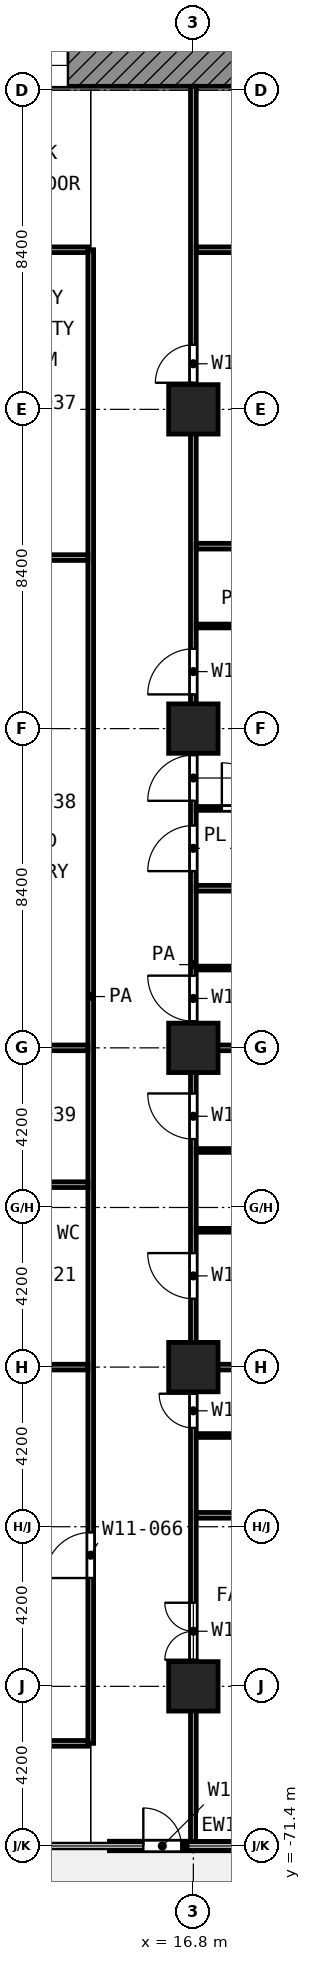
"""IFC4 building model, lengths in metres.
Left out: names, types, materials, properties, quantities, classifications, styles, units other than length and angle.
Written with IfcOpenShell. Run it as: python <this file> out.ifc"""

import sys

from ifc_helpers import new_model, si_unit, direction, frame, frame_2d, origin, origin_2d, place, context, subcontext, project, spatial, rectangle, extrude, element, fill, save


model = new_model("IFC4")
c1 = context("Model", 3, precision=1e-05, world=origin(), true_north=direction((0.0, 1.0)))
c2 = subcontext(c1, "Body", "Model", "MODEL_VIEW")
j1 = project(units=[si_unit("LENGTHUNIT", "METRE"), si_unit("PLANEANGLEUNIT", "RADIAN")], contexts=[c1])
p1 = place(None, origin())
s1 = spatial("IfcSite", under=j1, at=p1, CompositionType="ELEMENT")
p2 = place(p1, origin())
s2 = spatial("IfcBuilding", under=s1, at=p2, CompositionType="ELEMENT")
p3 = place(p2, frame((0.0, 0.0, 72.8)))
s3 = spatial("IfcBuildingStorey", under=s2, at=p3, CompositionType="ELEMENT", Elevation=72.8)
for number, where, z_axis, x_axis in (
    (1, (16.8, -33.6, 0.0), (0.0, 0.0, 1.0), (1.0, 0.0, 0.0)),
    (2, (16.8, -42.0, 0.0), (0.0, 0.0, 1.0), (1.0, 0.0, 0.0)),
    (3, (16.8, -50.4, 0.0), (0.0, 0.0, 1.0), (1.0, 0.0, 0.0)),
    (4, (16.8, -58.8, 0.0), (0.0, 0.0, 1.0), (1.0, 0.0, 0.0)),
    (5, (16.8, -67.2, 0.0), (0.0, 0.0, 1.0), (1.0, 0.0, 0.0)),
):
    element("IfcColumn", number, at=place(p3, frame(where, z_axis=z_axis, x_axis=x_axis)), inside=s3, PredefinedType="COLUMN", context=c2, shape_type="SweptSolid", body=[
        extrude(rectangle(XDim=1.3, YDim=1.3, at=origin_2d()), origin(), (0.0, 0.0, 1.0), 4.2),
    ])
p4 = place(p3, frame((14.592, -71.4, 0.0), z_axis=(0.0, 0.0, 1.0), x_axis=(1.0, 0.0, 0.0)))
e6 = element("IfcWall", 6, at=p4, inside=s3, PredefinedType="SOLIDWALL", context=c2, shape_type="SweptSolid", body=[
    extrude(rectangle(XDim=3.983, YDim=0.25, at=frame_2d((1.992, 0.0))), origin(), (0.0, 0.0, 1.0), 3.78),
])
p5 = place(p4, frame((0.892, 0.0, 0.0)))
e7 = element("IfcOpeningElement", 7, at=p5, cuts=e6, PredefinedType="OPENING", context=c2, shape_type="SweptSolid", body=[
    extrude(rectangle(XDim=1.0, YDim=2.1, at=frame_2d((0.5, 1.05))), frame((0.0, 0.135, 0.0), z_axis=(0.0, -1.0, 0.0), x_axis=(1.0, 0.0, 0.0)), (0.0, 0.0, 1.0), 0.27),
])
p6 = place(p3, frame((5.4, -24.55, 0.0), z_axis=(0.0, 0.0, 1.0), x_axis=(1.0, 0.0, 0.0)))
e8 = element("IfcWall", 8, at=p6, inside=s3, PredefinedType="SHEAR", context=c2, shape_type="SweptSolid", body=[
    extrude(rectangle(XDim=18.6, YDim=1.1, at=frame_2d((9.3, 0.0))), origin(), (0.0, 0.0, 1.0), 3.9),
])
p7 = place(p6, frame((6.3, 0.0, 0.0)))
e9 = element("IfcOpeningElement", 9, at=p7, cuts=e8, PredefinedType="OPENING", context=c2, shape_type="SweptSolid", body=[
    extrude(rectangle(XDim=1.8, YDim=2.1, at=frame_2d((0.9, 1.05))), frame((0.0, 0.56, 0.0), z_axis=(0.0, -1.0, 0.0), x_axis=(1.0, 0.0, 0.0)), (0.0, 0.0, 1.0), 1.12),
])
p8 = place(p3, frame((16.875, -60.6, 0.0), z_axis=(0.0, 0.0, 1.0), x_axis=(1.0, 0.0, 0.0)))
e10 = element("IfcWall", 10, at=p8, inside=s3, PredefinedType="PARTITIONING", context=c2, shape_type="SweptSolid", body=[
    extrude(rectangle(XDim=3.175, YDim=0.1, at=frame_2d((1.587, 0.0))), origin(), (0.0, 0.0, 1.0), 3.9),
])
p9 = place(p3, frame((16.875, -55.2, 0.0), z_axis=(0.0, 0.0, 1.0), x_axis=(1.0, 0.0, 0.0)))
e11 = element("IfcWall", 11, at=p9, inside=s3, PredefinedType="PARTITIONING", context=c2, shape_type="SweptSolid", body=[
    extrude(rectangle(XDim=2.573, YDim=0.1, at=frame_2d((1.287, 0.0))), origin(), (0.0, 0.0, 1.0), 3.9),
])
p10 = place(p3, frame((16.875, -53.1, 0.0), z_axis=(0.0, 0.0, 1.0), x_axis=(1.0, 0.0, 0.0)))
e12 = element("IfcWall", 12, at=p10, inside=s3, PredefinedType="PARTITIONING", context=c2, shape_type="SweptSolid", body=[
    extrude(rectangle(XDim=2.574, YDim=0.1, at=frame_2d((1.287, 0.0))), origin(), (0.0, 0.0, 1.0), 3.9),
])
p11 = place(p3, frame((16.875, -48.3, 0.0), z_axis=(0.0, 0.0, 1.0), x_axis=(1.0, 0.0, 0.0)))
e13 = element("IfcWall", 13, at=p11, inside=s3, PredefinedType="PARTITIONING", context=c2, shape_type="SweptSolid", body=[
    extrude(rectangle(XDim=2.575, YDim=0.1, at=frame_2d((1.288, 0.0))), origin(), (0.0, 0.0, 1.0), 3.9),
])
p12 = place(p3, frame((16.875, -44.1, 0.0), z_axis=(0.0, 0.0, 1.0), x_axis=(1.0, 0.0, 0.0)))
e14 = element("IfcWall", 14, at=p12, inside=s3, PredefinedType="PARTITIONING", context=c2, shape_type="SweptSolid", body=[
    extrude(rectangle(XDim=2.575, YDim=0.1, at=frame_2d((1.288, 0.0))), origin(), (0.0, 0.0, 1.0), 3.9),
])
p13 = place(p12, frame((0.675, 0.0, 0.0)))
e15 = element("IfcOpeningElement", 15, at=p13, cuts=e14, PredefinedType="OPENING", context=c2, shape_type="SweptSolid", body=[
    extrude(rectangle(XDim=1.2, YDim=2.1, at=frame_2d((0.6, 1.05))), frame((0.0, 0.06, 0.0), z_axis=(0.0, -1.0, 0.0), x_axis=(1.0, 0.0, 0.0)), (0.0, 0.0, 1.0), 0.12),
])
p14 = place(p3, frame((16.875, -39.3, 0.0), z_axis=(0.0, 0.0, 1.0), x_axis=(1.0, 0.0, 0.0)))
e16 = element("IfcWall", 16, at=p14, inside=s3, PredefinedType="PARTITIONING", context=c2, shape_type="SweptSolid", body=[
    extrude(rectangle(XDim=2.575, YDim=0.1, at=frame_2d((1.288, 0.0))), origin(), (0.0, 0.0, 1.0), 3.9),
])
p15 = place(p3, frame((11.175, -68.7, 0.0), z_axis=(0.0, 0.0, 1.0), x_axis=(1.0, 0.0, 0.0)))
e17 = element("IfcWall", 17, at=p15, inside=s3, PredefinedType="PARTITIONING", context=c2, shape_type="SweptSolid", body=[
    extrude(rectangle(XDim=2.85, YDim=0.15, at=frame_2d((1.425, 0.0))), origin(), (0.0, 0.0, 1.0), 3.9),
])
p16 = place(p3, frame((16.875, -62.7, 0.0), z_axis=(0.0, 0.0, 1.0), x_axis=(1.0, 0.0, 0.0)))
e18 = element("IfcWall", 18, at=p16, inside=s3, PredefinedType="PARTITIONING", context=c2, shape_type="SweptSolid", body=[
    extrude(rectangle(XDim=8.245, YDim=0.15, at=frame_2d((4.123, 0.0))), origin(), (0.0, 0.0, 1.0), 3.9),
])
p17 = place(p3, frame((11.175, -58.8, 0.0), z_axis=(0.0, 0.0, 1.0), x_axis=(1.0, 0.0, 0.0)))
e19 = element("IfcWall", 19, at=p17, inside=s3, PredefinedType="PARTITIONING", context=c2, shape_type="SweptSolid", body=[
    extrude(rectangle(XDim=2.85, YDim=0.15, at=frame_2d((1.425, 0.0))), origin(), (0.0, 0.0, 1.0), 3.9),
])
p18 = place(p3, frame((16.875, -58.8, 0.0), z_axis=(0.0, 0.0, 1.0), x_axis=(1.0, 0.0, 0.0)))
e20 = element("IfcWall", 20, at=p18, inside=s3, PredefinedType="PARTITIONING", context=c2, shape_type="SweptSolid", body=[
    extrude(rectangle(XDim=8.245, YDim=0.15, at=frame_2d((4.123, 0.0))), origin(), (0.0, 0.0, 1.0), 3.9),
])
for number, where, z_axis, x_axis in (
    (21, (11.175, -54.0, 0.0), (0.0, 0.0, 1.0), (1.0, 0.0, 0.0)),
    (22, (11.175, -50.4, 0.0), (0.0, 0.0, 1.0), (1.0, 0.0, 0.0)),
):
    element("IfcWall", number, at=place(p3, frame(where, z_axis=z_axis, x_axis=x_axis)), inside=s3, PredefinedType="PARTITIONING", context=c2, shape_type="SweptSolid", body=[
        extrude(rectangle(XDim=2.85, YDim=0.15, at=frame_2d((1.425, 0.0))), origin(), (0.0, 0.0, 1.0), 3.9),
    ])
for number, where, z_axis, x_axis in (
    (23, (16.875, -50.4, 0.0), (0.0, 0.0, 1.0), (1.0, 0.0, 0.0)),
    (24, (16.875, -46.2, 0.0), (0.0, 0.0, 1.0), (1.0, 0.0, 0.0)),
):
    element("IfcWall", number, at=place(p3, frame(where, z_axis=z_axis, x_axis=x_axis)), inside=s3, PredefinedType="PARTITIONING", context=c2, shape_type="SweptSolid", body=[
        extrude(rectangle(XDim=8.245, YDim=0.15, at=frame_2d((4.123, 0.0))), origin(), (0.0, 0.0, 1.0), 3.9),
    ])
p19 = place(p3, frame((11.175, -37.5, 0.0), z_axis=(0.0, 0.0, 1.0), x_axis=(1.0, 0.0, 0.0)))
e25 = element("IfcWall", 25, at=p19, inside=s3, PredefinedType="PARTITIONING", context=c2, shape_type="SweptSolid", body=[
    extrude(rectangle(XDim=2.85, YDim=0.15, at=frame_2d((1.425, 0.0))), origin(), (0.0, 0.0, 1.0), 3.9),
])
p20 = place(p3, frame((16.875, -37.2, 0.0), z_axis=(0.0, 0.0, 1.0), x_axis=(1.0, 0.0, 0.0)))
e26 = element("IfcWall", 26, at=p20, inside=s3, PredefinedType="PARTITIONING", context=c2, shape_type="SweptSolid", body=[
    extrude(rectangle(XDim=8.245, YDim=0.15, at=frame_2d((4.123, 0.0))), origin(), (0.0, 0.0, 1.0), 3.9),
])
p21 = place(p3, frame((11.175, -29.4, 0.0), z_axis=(0.0, 0.0, 1.0), x_axis=(1.0, 0.0, 0.0)))
e27 = element("IfcWall", 27, at=p21, inside=s3, PredefinedType="PARTITIONING", context=c2, shape_type="SweptSolid", body=[
    extrude(rectangle(XDim=2.85, YDim=0.15, at=frame_2d((1.425, 0.0))), origin(), (0.0, 0.0, 1.0), 3.9),
])
p22 = place(p3, frame((16.875, -29.4, 0.0), z_axis=(0.0, 0.0, 1.0), x_axis=(1.0, 0.0, 0.0)))
e28 = element("IfcWall", 28, at=p22, inside=s3, PredefinedType="PARTITIONING", context=c2, shape_type="SweptSolid", body=[
    extrude(rectangle(XDim=8.25, YDim=0.15, at=frame_2d((4.125, 0.0))), origin(), (0.0, 0.0, 1.0), 3.9),
])
p23 = place(p3, frame((14.1, -68.7, 0.0), z_axis=(0.0, 0.0, 1.0), x_axis=(0.0, 1.0, 0.0)))
e29 = element("IfcWall", 29, at=p23, inside=s3, PredefinedType="PARTITIONING", context=c2, shape_type="SweptSolid", body=[
    extrude(rectangle(XDim=39.3, YDim=0.15, at=frame_2d((19.65, 0.0))), origin(), (0.0, 0.0, 1.0), 3.9),
])
p24 = place(p23, frame((4.35, 0.0, 0.0)))
e30 = element("IfcOpeningElement", 30, at=p24, cuts=e29, PredefinedType="OPENING", context=c2, shape_type="SweptSolid", body=[
    extrude(rectangle(XDim=1.2, YDim=2.1, at=frame_2d((0.6, 1.05))), frame((0.0, 0.085, 0.0), z_axis=(0.0, -1.0, 0.0), x_axis=(1.0, 0.0, 0.0)), (0.0, 0.0, 1.0), 0.17),
])
p25 = place(p3, frame((16.8, -71.32, 0.0), z_axis=(0.0, 0.0, 1.0), x_axis=(0.0, 1.0, 0.0)))
e31 = element("IfcWall", 31, at=p25, inside=s3, PredefinedType="PARTITIONING", context=c2, shape_type="SweptSolid", body=[
    extrude(rectangle(XDim=46.22, YDim=0.15, at=frame_2d((23.11, 0.0))), origin(), (0.0, 0.0, 1.0), 3.9),
])
p26 = place(p25, frame((38.42, 0.0, 0.0)))
e32 = element("IfcOpeningElement", 32, at=p26, cuts=e31, PredefinedType="OPENING", context=c2, shape_type="SweptSolid", body=[
    extrude(rectangle(XDim=1.0, YDim=2.1, at=frame_2d((0.5, 1.05))), frame((0.0, 0.085, 0.0), z_axis=(0.0, -1.0, 0.0), x_axis=(1.0, 0.0, 0.0)), (0.0, 0.0, 1.0), 0.17),
])
p27 = place(p25, frame((30.22, 0.0, 0.0)))
e33 = element("IfcOpeningElement", 33, at=p27, cuts=e31, PredefinedType="OPENING", context=c2, shape_type="SweptSolid", body=[
    extrude(rectangle(XDim=1.2, YDim=2.1, at=frame_2d((0.6, 1.05))), frame((0.0, 0.085, 0.0), z_axis=(0.0, -1.0, 0.0), x_axis=(1.0, 0.0, 0.0)), (0.0, 0.0, 1.0), 0.17),
])
p28 = place(p25, frame((27.42, 0.0, 0.0)))
e34 = element("IfcOpeningElement", 34, at=p28, cuts=e31, PredefinedType="OPENING", context=c2, shape_type="SweptSolid", body=[
    extrude(rectangle(XDim=1.2, YDim=2.1, at=frame_2d((0.6, 1.05))), frame((0.0, 0.085, 0.0), z_axis=(0.0, -1.0, 0.0), x_axis=(1.0, 0.0, 0.0)), (0.0, 0.0, 1.0), 0.17),
])
p29 = place(p25, frame((25.57, 0.0, 0.0)))
e35 = element("IfcOpeningElement", 35, at=p29, cuts=e31, PredefinedType="OPENING", context=c2, shape_type="SweptSolid", body=[
    extrude(rectangle(XDim=1.2, YDim=2.1, at=frame_2d((0.6, 1.05))), frame((0.0, 0.085, 0.0), z_axis=(0.0, -1.0, 0.0), x_axis=(1.0, 0.0, 0.0)), (0.0, 0.0, 1.0), 0.17),
])
p30 = place(p25, frame((21.62, 0.0, 0.0)))
e36 = element("IfcOpeningElement", 36, at=p30, cuts=e31, PredefinedType="OPENING", context=c2, shape_type="SweptSolid", body=[
    extrude(rectangle(XDim=1.2, YDim=2.1, at=frame_2d((0.6, 1.05))), frame((0.0, 0.085, 0.0), z_axis=(0.0, -1.0, 0.0), x_axis=(1.0, 0.0, 0.0)), (0.0, 0.0, 1.0), 0.17),
])
p31 = place(p25, frame((14.32, 0.0, 0.0)))
e37 = element("IfcOpeningElement", 37, at=p31, cuts=e31, PredefinedType="OPENING", context=c2, shape_type="SweptSolid", body=[
    extrude(rectangle(XDim=1.2, YDim=2.1, at=frame_2d((0.6, 1.05))), frame((0.0, 0.085, 0.0), z_axis=(0.0, -1.0, 0.0), x_axis=(1.0, 0.0, 0.0)), (0.0, 0.0, 1.0), 0.17),
])
p32 = place(p25, frame((18.52, 0.0, 0.0)))
e38 = element("IfcOpeningElement", 38, at=p32, cuts=e31, PredefinedType="OPENING", context=c2, shape_type="SweptSolid", body=[
    extrude(rectangle(XDim=1.2, YDim=2.1, at=frame_2d((0.6, 1.05))), frame((0.0, 0.085, 0.0), z_axis=(0.0, -1.0, 0.0), x_axis=(1.0, 0.0, 0.0)), (0.0, 0.0, 1.0), 0.17),
])
p33 = place(p25, frame((10.92, 0.0, 0.0)))
e39 = element("IfcOpeningElement", 39, at=p33, cuts=e31, PredefinedType="OPENING", context=c2, shape_type="SweptSolid", body=[
    extrude(rectangle(XDim=0.9, YDim=2.1, at=frame_2d((0.45, 1.05))), frame((0.0, 0.085, 0.0), z_axis=(0.0, -1.0, 0.0), x_axis=(1.0, 0.0, 0.0)), (0.0, 0.0, 1.0), 0.17),
])
p34 = place(p25, frame((4.82, 0.0, 0.0)))
e40 = element("IfcOpeningElement", 40, at=p34, cuts=e31, PredefinedType="OPENING", context=c2, shape_type="SweptSolid", body=[
    extrude(rectangle(XDim=1.5, YDim=2.1, at=frame_2d((0.75, 1.05))), frame((0.0, 0.085, 0.0), z_axis=(0.0, -1.0, 0.0), x_axis=(1.0, 0.0, 0.0)), (0.0, 0.0, 1.0), 0.17),
])
p35 = place(p5, origin())
e41 = element("IfcDoor", 41, at=p35, inside=s3, OperationType="SINGLE_SWING_LEFT", PredefinedType="DOOR", context=c2, shape_type="SweptSolid", body=[
    extrude(rectangle(XDim=1.0, YDim=2.1, at=frame_2d((0.5, 1.05))), frame((0.0, 0.025, 0.0), z_axis=(0.0, -1.0, 0.0), x_axis=(1.0, 0.0, 0.0)), (0.0, 0.0, 1.0), 0.05),
])
fill(e7, e41)
p36 = place(p7, origin())
e42 = element("IfcDoor", 42, at=p36, inside=s3, OperationType="DOUBLE_DOOR_SINGLE_SWING", PredefinedType="DOOR", context=c2, shape_type="SweptSolid", body=[
    extrude(rectangle(XDim=1.8, YDim=2.1, at=frame_2d((0.9, 1.05))), frame((0.0, 0.025, 0.0), z_axis=(0.0, -1.0, 0.0), x_axis=(1.0, 0.0, 0.0)), (0.0, 0.0, 1.0), 0.05),
])
fill(e9, e42)
p37 = place(p24, origin())
e43 = element("IfcDoor", 43, at=p37, inside=s3, OperationType="SINGLE_SWING_LEFT", PredefinedType="DOOR", context=c2, shape_type="SweptSolid", body=[
    extrude(rectangle(XDim=1.2, YDim=2.1, at=frame_2d((0.6, 1.05))), frame((0.0, 0.025, 0.0), z_axis=(0.0, -1.0, 0.0), x_axis=(1.0, 0.0, 0.0)), (0.0, 0.0, 1.0), 0.05),
])
fill(e30, e43)
p38 = place(p26, origin())
e44 = element("IfcDoor", 44, at=p38, inside=s3, OperationType="SINGLE_SWING_LEFT", PredefinedType="DOOR", context=c2, shape_type="SweptSolid", body=[
    extrude(rectangle(XDim=1.0, YDim=2.1, at=frame_2d((0.5, 1.05))), frame((0.0, 0.025, 0.0), z_axis=(0.0, -1.0, 0.0), x_axis=(1.0, 0.0, 0.0)), (0.0, 0.0, 1.0), 0.05),
])
fill(e32, e44)
p39 = place(p27, origin())
e45 = element("IfcDoor", 45, at=p39, inside=s3, OperationType="SINGLE_SWING_LEFT", PredefinedType="DOOR", context=c2, shape_type="SweptSolid", body=[
    extrude(rectangle(XDim=1.2, YDim=2.1, at=frame_2d((0.6, 1.05))), frame((0.0, 0.025, 0.0), z_axis=(0.0, -1.0, 0.0), x_axis=(1.0, 0.0, 0.0)), (0.0, 0.0, 1.0), 0.05),
])
fill(e33, e45)
p40 = place(p28, origin())
e46 = element("IfcDoor", 46, at=p40, inside=s3, OperationType="SINGLE_SWING_LEFT", PredefinedType="DOOR", context=c2, shape_type="SweptSolid", body=[
    extrude(rectangle(XDim=1.2, YDim=2.1, at=frame_2d((0.6, 1.05))), frame((0.0, 0.025, 0.0), z_axis=(0.0, -1.0, 0.0), x_axis=(1.0, 0.0, 0.0)), (0.0, 0.0, 1.0), 0.05),
])
fill(e34, e46)
p41 = place(p29, origin())
e47 = element("IfcDoor", 47, at=p41, inside=s3, OperationType="SINGLE_SWING_LEFT", PredefinedType="DOOR", context=c2, shape_type="SweptSolid", body=[
    extrude(rectangle(XDim=1.2, YDim=2.1, at=frame_2d((0.6, 1.05))), frame((0.0, 0.025, 0.0), z_axis=(0.0, -1.0, 0.0), x_axis=(1.0, 0.0, 0.0)), (0.0, 0.0, 1.0), 0.05),
])
fill(e35, e47)
p42 = place(p13, origin())
e48 = element("IfcDoor", 48, at=p42, inside=s3, OperationType="SINGLE_SWING_LEFT", PredefinedType="DOOR", context=c2, shape_type="SweptSolid", body=[
    extrude(rectangle(XDim=1.2, YDim=2.1, at=frame_2d((0.6, 1.05))), frame((0.0, 0.025, 0.0), z_axis=(0.0, -1.0, 0.0), x_axis=(1.0, 0.0, 0.0)), (0.0, 0.0, 1.0), 0.05),
])
fill(e15, e48)
p43 = place(p30, origin())
e49 = element("IfcDoor", 49, at=p43, inside=s3, OperationType="SINGLE_SWING_RIGHT", PredefinedType="DOOR", context=c2, shape_type="SweptSolid", body=[
    extrude(rectangle(XDim=1.2, YDim=2.1, at=frame_2d((0.6, 1.05))), frame((0.0, 0.025, 0.0), z_axis=(0.0, -1.0, 0.0), x_axis=(1.0, 0.0, 0.0)), (0.0, 0.0, 1.0), 0.05),
])
fill(e36, e49)
p44 = place(p31, origin())
e50 = element("IfcDoor", 50, at=p44, inside=s3, OperationType="SINGLE_SWING_RIGHT", PredefinedType="DOOR", context=c2, shape_type="SweptSolid", body=[
    extrude(rectangle(XDim=1.2, YDim=2.1, at=frame_2d((0.6, 1.05))), frame((0.0, 0.025, 0.0), z_axis=(0.0, -1.0, 0.0), x_axis=(1.0, 0.0, 0.0)), (0.0, 0.0, 1.0), 0.05),
])
fill(e37, e50)
p45 = place(p32, origin())
e51 = element("IfcDoor", 51, at=p45, inside=s3, OperationType="SINGLE_SWING_RIGHT", PredefinedType="DOOR", context=c2, shape_type="SweptSolid", body=[
    extrude(rectangle(XDim=1.2, YDim=2.1, at=frame_2d((0.6, 1.05))), frame((0.0, 0.025, 0.0), z_axis=(0.0, -1.0, 0.0), x_axis=(1.0, 0.0, 0.0)), (0.0, 0.0, 1.0), 0.05),
])
fill(e38, e51)
p46 = place(p33, origin())
e52 = element("IfcDoor", 52, at=p46, inside=s3, OperationType="SINGLE_SWING_RIGHT", PredefinedType="DOOR", context=c2, shape_type="SweptSolid", body=[
    extrude(rectangle(XDim=0.9, YDim=2.1, at=frame_2d((0.45, 1.05))), frame((0.0, 0.025, 0.0), z_axis=(0.0, -1.0, 0.0), x_axis=(1.0, 0.0, 0.0)), (0.0, 0.0, 1.0), 0.05),
])
fill(e39, e52)
p47 = place(p34, origin())
e53 = element("IfcDoor", 53, at=p47, inside=s3, OperationType="DOUBLE_DOOR_SINGLE_SWING", PredefinedType="DOOR", context=c2, shape_type="SweptSolid", body=[
    extrude(rectangle(XDim=1.5, YDim=2.1, at=frame_2d((0.75, 1.05))), frame((0.0, 0.025, 0.0), z_axis=(0.0, -1.0, 0.0), x_axis=(1.0, 0.0, 0.0)), (0.0, 0.0, 1.0), 0.05),
])
fill(e40, e53)
save(model, sys.argv[1])
